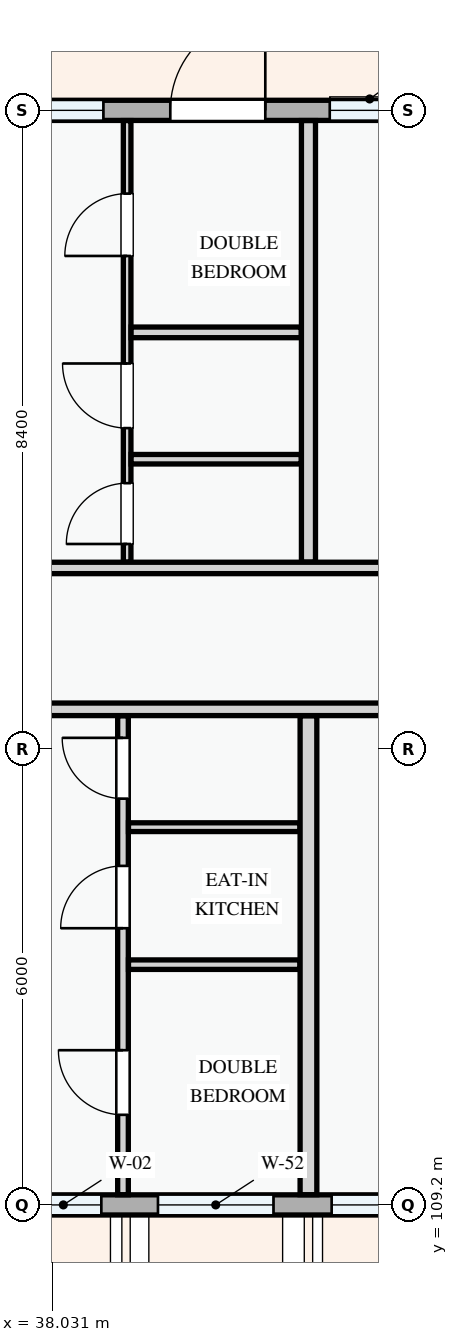
"""IFC4 building model, lengths in metres.
Left out: names, types, materials, properties, quantities, classifications, styles, units other than length and angle.
Written with IfcOpenShell. Run it as: python <this file> out.ifc"""

import sys

from ifc_helpers import new_model, si_unit, direction, frame, frame_2d, origin, place, context, subcontext, project, spatial, rectangle, extrude, element, fill, save


model = new_model("IFC4")
c1 = context("Model", 3, precision=1e-05, world=origin(), true_north=direction((0.0, 1.0)))
c2 = subcontext(c1, "Body", "Model", "MODEL_VIEW")
j1 = project(units=[si_unit("LENGTHUNIT", "METRE"), si_unit("PLANEANGLEUNIT", "RADIAN")], contexts=[c1])
p1 = place(None, origin())
s1 = spatial("IfcSite", under=j1, at=p1, CompositionType="ELEMENT")
p2 = place(p1, origin())
s2 = spatial("IfcBuilding", under=s1, at=p2, CompositionType="ELEMENT")
p3 = place(p2, frame((0.0, 0.0, 34.5)))
s3 = spatial("IfcBuildingStorey", under=s2, at=p3, CompositionType="ELEMENT", Elevation=34.5)
p4 = place(p3, frame((37.2, 109.2, 0.0), z_axis=(0.0, 0.0, 1.0), x_axis=(1.0, 0.0, 0.0)))
e1 = element("IfcWall", 1, at=p4, inside=s3, PredefinedType="STANDARD", context=c2, shape_type="SweptSolid", body=[
    extrude(rectangle(XDim=6.0, YDim=0.265, at=frame_2d((3.0, 0.0))), origin(), (0.0, 0.0, 1.0), 2.525),
])
p5 = place(p4, frame((0.475, 0.0, 0.78)))
e2 = element("IfcOpeningElement", 2, at=p5, cuts=e1, PredefinedType="OPENING", context=c2, shape_type="SweptSolid", body=[
    extrude(rectangle(XDim=1.0, YDim=1.25, at=frame_2d((0.5, 0.625))), frame((0.0, 0.143, 0.0), z_axis=(0.0, -1.0, 0.0), x_axis=(1.0, 0.0, 0.0)), (0.0, 0.0, 1.0), 0.285),
])
p6 = place(p4, frame((2.22, 0.0, 0.78)))
e3 = element("IfcOpeningElement", 3, at=p6, cuts=e1, PredefinedType="OPENING", context=c2, shape_type="SweptSolid", body=[
    extrude(rectangle(XDim=1.52, YDim=1.42, at=frame_2d((0.76, 0.71))), frame((0.0, 0.143, 0.0), z_axis=(0.0, -1.0, 0.0), x_axis=(1.0, 0.0, 0.0)), (0.0, 0.0, 1.0), 0.285),
])
p7 = place(p4, frame((4.505, 0.0, 0.78)))
e4 = element("IfcOpeningElement", 4, at=p7, cuts=e1, PredefinedType="OPENING", context=c2, shape_type="SweptSolid", body=[
    extrude(rectangle(XDim=1.0, YDim=1.25, at=frame_2d((0.5, 0.625))), frame((0.0, 0.143, 0.0), z_axis=(0.0, -1.0, 0.0), x_axis=(1.0, 0.0, 0.0)), (0.0, 0.0, 1.0), 0.285),
])
p8 = place(p3, frame((43.2, 123.6, 0.0), z_axis=(0.0, 0.0, 1.0), x_axis=(-1.0, 0.0, 0.0)))
e5 = element("IfcWall", 5, at=p8, inside=s3, PredefinedType="STANDARD", context=c2, shape_type="SweptSolid", body=[
    extrude(rectangle(XDim=6.0, YDim=0.265, at=frame_2d((3.0, 0.0))), origin(), (0.0, 0.0, 1.0), 2.445),
])
p9 = place(p8, frame((2.368, 0.0, 0.0)))
e6 = element("IfcOpeningElement", 6, at=p9, cuts=e5, PredefinedType="OPENING", context=c2, shape_type="SweptSolid", body=[
    extrude(rectangle(XDim=1.25, YDim=2.2, at=frame_2d((0.625, 1.1))), frame((0.0, 0.143, 0.0), z_axis=(0.0, -1.0, 0.0), x_axis=(1.0, 0.0, 0.0)), (0.0, 0.0, 1.0), 0.285),
])
p10 = place(p8, frame((0.47, 0.0, 0.78)))
e7 = element("IfcOpeningElement", 7, at=p10, cuts=e5, PredefinedType="OPENING", context=c2, shape_type="SweptSolid", body=[
    extrude(rectangle(XDim=1.05, YDim=1.2, at=frame_2d((0.525, 0.6))), frame((0.0, 0.143, 0.0), z_axis=(0.0, -1.0, 0.0), x_axis=(1.0, 0.0, 0.0)), (0.0, 0.0, 1.0), 0.285),
])
p11 = place(p8, frame((4.498, 0.0, 0.78)))
e8 = element("IfcOpeningElement", 8, at=p11, cuts=e5, PredefinedType="OPENING", context=c2, shape_type="SweptSolid", body=[
    extrude(rectangle(XDim=1.0, YDim=1.25, at=frame_2d((0.5, 0.625))), frame((0.0, 0.143, 0.0), z_axis=(0.0, -1.0, 0.0), x_axis=(1.0, 0.0, 0.0)), (0.0, 0.0, 1.0), 0.285),
])
p12 = place(p3, frame((38.96, 109.334, 0.0), z_axis=(0.0, 0.0, 1.0), x_axis=(0.0, 1.0, 0.0)))
e9 = element("IfcWall", 9, at=p12, inside=s3, PredefinedType="PARTITIONING", context=c2, shape_type="SweptSolid", body=[
    extrude(rectangle(XDim=6.301, YDim=0.14, at=frame_2d((3.15, 0.0))), origin(), (0.0, 0.0, 1.0), 3.0),
])
p13 = place(p12, frame((1.051, 0.0, 0.0)))
e10 = element("IfcOpeningElement", 10, at=p13, cuts=e9, PredefinedType="OPENING", context=c2, shape_type="SweptSolid", body=[
    extrude(rectangle(XDim=0.85, YDim=2.1, at=frame_2d((0.425, 1.05))), frame((0.0, 0.08, 0.0), z_axis=(0.0, -1.0, 0.0), x_axis=(1.0, 0.0, 0.0)), (0.0, 0.0, 1.0), 0.16),
])
p14 = place(p12, frame((3.506, 0.0, 0.0)))
e11 = element("IfcOpeningElement", 11, at=p14, cuts=e9, PredefinedType="OPENING", context=c2, shape_type="SweptSolid", body=[
    extrude(rectangle(XDim=0.82, YDim=2.08, at=frame_2d((0.41, 1.04))), frame((0.0, 0.08, 0.0), z_axis=(0.0, -1.0, 0.0), x_axis=(1.0, 0.0, 0.0)), (0.0, 0.0, 1.0), 0.16),
])
p15 = place(p12, frame((5.21, 0.0, 0.0)))
e12 = element("IfcOpeningElement", 12, at=p15, cuts=e9, PredefinedType="OPENING", context=c2, shape_type="SweptSolid", body=[
    extrude(rectangle(XDim=0.8, YDim=2.1, at=frame_2d((0.4, 1.05))), frame((0.0, 0.08, 0.0), z_axis=(0.0, -1.0, 0.0), x_axis=(1.0, 0.0, 0.0)), (0.0, 0.0, 1.0), 0.16),
])
p16 = place(p3, frame((39.032, 112.361, 0.0), z_axis=(0.0, 0.0, 1.0), x_axis=(1.0, 0.0, 0.0)))
e13 = element("IfcWall", 13, at=p16, inside=s3, PredefinedType="PARTITIONING", context=c2, shape_type="SweptSolid", body=[
    extrude(rectangle(XDim=2.256, YDim=0.125, at=frame_2d((1.128, 0.0))), origin(), (0.0, 0.0, 1.0), 3.0),
])
p17 = place(p3, frame((39.032, 114.17, 0.0), z_axis=(0.0, 0.0, 1.0), x_axis=(1.0, 0.0, 0.0)))
e14 = element("IfcWall", 14, at=p17, inside=s3, PredefinedType="PARTITIONING", context=c2, shape_type="SweptSolid", body=[
    extrude(rectangle(XDim=2.256, YDim=0.115, at=frame_2d((1.128, 0.0))), origin(), (0.0, 0.0, 1.0), 3.0),
])
p18 = place(p3, frame((39.014, 117.657, 0.0), z_axis=(0.0, 0.0, 1.0), x_axis=(0.0, 1.0, 0.0)))
e15 = element("IfcWall", 15, at=p18, inside=s3, PredefinedType="PARTITIONING", context=c2, shape_type="SweptSolid", body=[
    extrude(rectangle(XDim=5.809, YDim=0.1, at=frame_2d((2.904, 0.0))), origin(), (0.0, 0.0, 1.0), 3.0),
])
p19 = place(p18, frame((0.238, 0.0, 0.0)))
e16 = element("IfcOpeningElement", 16, at=p19, cuts=e15, PredefinedType="OPENING", context=c2, shape_type="SweptSolid", body=[
    extrude(rectangle(XDim=0.8, YDim=2.1, at=frame_2d((0.4, 1.05))), frame((0.0, 0.06, 0.0), z_axis=(0.0, -1.0, 0.0), x_axis=(1.0, 0.0, 0.0)), (0.0, 0.0, 1.0), 0.12),
])
p20 = place(p18, frame((1.763, 0.0, 0.0)))
e17 = element("IfcOpeningElement", 17, at=p20, cuts=e15, PredefinedType="OPENING", context=c2, shape_type="SweptSolid", body=[
    extrude(rectangle(XDim=0.85, YDim=2.1, at=frame_2d((0.425, 1.05))), frame((0.0, 0.06, 0.0), z_axis=(0.0, -1.0, 0.0), x_axis=(1.0, 0.0, 0.0)), (0.0, 0.0, 1.0), 0.12),
])
p21 = place(p18, frame((4.028, 0.0, 0.0)))
e18 = element("IfcOpeningElement", 18, at=p21, cuts=e15, PredefinedType="OPENING", context=c2, shape_type="SweptSolid", body=[
    extrude(rectangle(XDim=0.82, YDim=2.08, at=frame_2d((0.41, 1.04))), frame((0.0, 0.06, 0.0), z_axis=(0.0, -1.0, 0.0), x_axis=(1.0, 0.0, 0.0)), (0.0, 0.0, 1.0), 0.12),
])
p22 = place(p3, frame((39.066, 120.679, 0.0), z_axis=(0.0, 0.0, 1.0), x_axis=(1.0, 0.0, 0.0)))
e19 = element("IfcWall", 19, at=p22, inside=s3, PredefinedType="PARTITIONING", context=c2, shape_type="SweptSolid", body=[
    extrude(rectangle(XDim=2.239, YDim=0.14, at=frame_2d((1.12, 0.0))), origin(), (0.0, 0.0, 1.0), 3.0),
])
p23 = place(p3, frame((39.066, 119.01, 0.0), z_axis=(0.0, 0.0, 1.0), x_axis=(1.0, 0.0, 0.0)))
e20 = element("IfcWall", 20, at=p23, inside=s3, PredefinedType="PARTITIONING", context=c2, shape_type="SweptSolid", body=[
    extrude(rectangle(XDim=2.239, YDim=0.125, at=frame_2d((1.12, 0.0))), origin(), (0.0, 0.0, 1.0), 3.0),
])
p24 = place(p3, frame((41.4, 109.334, 0.0), z_axis=(0.0, 0.0, 1.0), x_axis=(0.0, 1.0, 0.0)))
e21 = element("IfcWall", 21, at=p24, inside=s3, PredefinedType="PARTITIONING", context=c2, shape_type="SweptSolid", body=[
    extrude(rectangle(XDim=6.301, YDim=0.22, at=frame_2d((3.15, 0.0))), origin(), (0.0, 0.0, 1.0), 3.0),
])
p25 = place(p3, frame((41.4, 117.657, 0.0), z_axis=(0.0, 0.0, 1.0), x_axis=(0.0, 1.0, 0.0)))
e22 = element("IfcWall", 22, at=p25, inside=s3, PredefinedType="PARTITIONING", context=c2, shape_type="SweptSolid", body=[
    extrude(rectangle(XDim=5.809, YDim=0.185, at=frame_2d((2.904, 0.0))), origin(), (0.0, 0.0, 1.0), 3.0),
])
p26 = place(p3, frame((25.15, 115.72, 0.0), z_axis=(0.0, 0.0, 1.0), x_axis=(1.0, 0.0, 0.0)))
e23 = element("IfcWall", 23, at=p26, inside=s3, PredefinedType="PARTITIONING", context=c2, shape_type="SweptSolid", body=[
    extrude(rectangle(XDim=26.316, YDim=0.165, at=frame_2d((13.158, 0.0))), origin(), (0.0, 0.0, 1.0), 3.0),
])
p27 = place(p26, frame((0.25, 0.0, 0.0)))
e24 = element("IfcOpeningElement", 24, at=p27, cuts=e23, PredefinedType="OPENING", context=c2, shape_type="SweptSolid", body=[
    extrude(rectangle(XDim=0.92, YDim=2.1, at=frame_2d((0.46, 1.05))), frame((0.0, 0.093, 0.0), z_axis=(0.0, -1.0, 0.0), x_axis=(1.0, 0.0, 0.0)), (0.0, 0.0, 1.0), 0.185),
])
p28 = place(p26, frame((9.22, 0.0, 0.0)))
e25 = element("IfcOpeningElement", 25, at=p28, cuts=e23, PredefinedType="OPENING", context=c2, shape_type="SweptSolid", body=[
    extrude(rectangle(XDim=0.92, YDim=2.1, at=frame_2d((0.46, 1.05))), frame((0.0, 0.093, 0.0), z_axis=(0.0, -1.0, 0.0), x_axis=(1.0, 0.0, 0.0)), (0.0, 0.0, 1.0), 0.185),
])
p29 = place(p26, frame((20.11, 0.0, 0.0)))
e26 = element("IfcOpeningElement", 26, at=p29, cuts=e23, PredefinedType="OPENING", context=c2, shape_type="SweptSolid", body=[
    extrude(rectangle(XDim=0.92, YDim=2.1, at=frame_2d((0.46, 1.05))), frame((0.0, 0.093, 0.0), z_axis=(0.0, -1.0, 0.0), x_axis=(1.0, 0.0, 0.0)), (0.0, 0.0, 1.0), 0.185),
])
p30 = place(p3, frame((22.66, 117.58, 0.0), z_axis=(0.0, 0.0, 1.0), x_axis=(1.0, 0.0, 0.0)))
e27 = element("IfcWall", 27, at=p30, inside=s3, PredefinedType="PARTITIONING", context=c2, shape_type="SweptSolid", body=[
    extrude(rectangle(XDim=28.806, YDim=0.15, at=frame_2d((14.403, 0.0))), origin(), (0.0, 0.0, 1.0), 3.0),
])
p31 = place(p30, frame((2.74, 0.0, 0.0)))
e28 = element("IfcOpeningElement", 28, at=p31, cuts=e27, PredefinedType="OPENING", context=c2, shape_type="SweptSolid", body=[
    extrude(rectangle(XDim=0.92, YDim=2.1, at=frame_2d((0.46, 1.05))), frame((0.0, 0.085, 0.0), z_axis=(0.0, -1.0, 0.0), x_axis=(1.0, 0.0, 0.0)), (0.0, 0.0, 1.0), 0.17),
])
p32 = place(p30, frame((11.71, 0.0, 0.0)))
e29 = element("IfcOpeningElement", 29, at=p32, cuts=e27, PredefinedType="OPENING", context=c2, shape_type="SweptSolid", body=[
    extrude(rectangle(XDim=0.96, YDim=2.12, at=frame_2d((0.48, 1.06))), frame((0.0, 0.085, 0.0), z_axis=(0.0, -1.0, 0.0), x_axis=(1.0, 0.0, 0.0)), (0.0, 0.0, 1.0), 0.17),
])
p33 = place(p30, frame((22.397, 0.0, 0.0)))
e30 = element("IfcOpeningElement", 30, at=p33, cuts=e27, PredefinedType="OPENING", context=c2, shape_type="SweptSolid", body=[
    extrude(rectangle(XDim=0.92, YDim=2.1, at=frame_2d((0.46, 1.05))), frame((0.0, 0.085, 0.0), z_axis=(0.0, -1.0, 0.0), x_axis=(1.0, 0.0, 0.0)), (0.0, 0.0, 1.0), 0.17),
])
p34 = place(p5, origin())
e31 = element("IfcWindow", 31, at=p34, inside=s3, PartitioningType="SINGLE_PANEL", PredefinedType="WINDOW", context=c2, shape_type="SweptSolid", body=[
    extrude(rectangle(XDim=1.0, YDim=1.25, at=frame_2d((0.5, 0.625))), frame((0.0, 0.03, 0.0), z_axis=(0.0, -1.0, 0.0), x_axis=(1.0, 0.0, 0.0)), (0.0, 0.0, 1.0), 0.06),
])
fill(e2, e31)
p35 = place(p6, origin())
e32 = element("IfcWindow", 32, at=p35, inside=s3, PartitioningType="SINGLE_PANEL", PredefinedType="WINDOW", context=c2, shape_type="SweptSolid", body=[
    extrude(rectangle(XDim=1.52, YDim=1.42, at=frame_2d((0.76, 0.71))), frame((0.0, 0.03, 0.0), z_axis=(0.0, -1.0, 0.0), x_axis=(1.0, 0.0, 0.0)), (0.0, 0.0, 1.0), 0.06),
])
fill(e3, e32)
p36 = place(p7, origin())
e33 = element("IfcWindow", 33, at=p36, inside=s3, PartitioningType="SINGLE_PANEL", PredefinedType="WINDOW", context=c2, shape_type="SweptSolid", body=[
    extrude(rectangle(XDim=1.0, YDim=1.25, at=frame_2d((0.5, 0.625))), frame((0.0, 0.03, 0.0), z_axis=(0.0, -1.0, 0.0), x_axis=(1.0, 0.0, 0.0)), (0.0, 0.0, 1.0), 0.06),
])
fill(e4, e33)
p37 = place(p9, frame((1.25, 0.0, 0.0), z_axis=(0.0, 0.0, 1.0), x_axis=(-1.0, 0.0, 0.0)))
e34 = element("IfcDoor", 34, at=p37, inside=s3, OperationType="SINGLE_SWING_RIGHT", PredefinedType="DOOR", context=c2, shape_type="SweptSolid", body=[
    extrude(rectangle(XDim=1.25, YDim=2.2, at=frame_2d((0.625, 1.1))), frame((0.0, 0.025, 0.0), z_axis=(0.0, -1.0, 0.0), x_axis=(1.0, 0.0, 0.0)), (0.0, 0.0, 1.0), 0.05),
])
fill(e6, e34)
p38 = place(p10, origin())
e35 = element("IfcWindow", 35, at=p38, inside=s3, PartitioningType="SINGLE_PANEL", PredefinedType="WINDOW", context=c2, shape_type="SweptSolid", body=[
    extrude(rectangle(XDim=1.05, YDim=1.2, at=frame_2d((0.525, 0.6))), frame((0.0, 0.03, 0.0), z_axis=(0.0, -1.0, 0.0), x_axis=(1.0, 0.0, 0.0)), (0.0, 0.0, 1.0), 0.06),
])
fill(e7, e35)
p39 = place(p11, origin())
e36 = element("IfcWindow", 36, at=p39, inside=s3, PartitioningType="SINGLE_PANEL", PredefinedType="WINDOW", context=c2, shape_type="SweptSolid", body=[
    extrude(rectangle(XDim=1.0, YDim=1.25, at=frame_2d((0.5, 0.625))), frame((0.0, 0.03, 0.0), z_axis=(0.0, -1.0, 0.0), x_axis=(1.0, 0.0, 0.0)), (0.0, 0.0, 1.0), 0.06),
])
fill(e8, e36)
p40 = place(p13, origin())
e37 = element("IfcDoor", 37, at=p40, inside=s3, OperationType="SINGLE_SWING_RIGHT", PredefinedType="DOOR", context=c2, shape_type="SweptSolid", body=[
    extrude(rectangle(XDim=0.85, YDim=2.1, at=frame_2d((0.425, 1.05))), frame((0.0, 0.025, 0.0), z_axis=(0.0, -1.0, 0.0), x_axis=(1.0, 0.0, 0.0)), (0.0, 0.0, 1.0), 0.05),
])
fill(e10, e37)
p41 = place(p14, origin())
e38 = element("IfcDoor", 38, at=p41, inside=s3, OperationType="SINGLE_SWING_LEFT", PredefinedType="DOOR", context=c2, shape_type="SweptSolid", body=[
    extrude(rectangle(XDim=0.82, YDim=2.08, at=frame_2d((0.41, 1.04))), frame((0.0, 0.025, 0.0), z_axis=(0.0, -1.0, 0.0), x_axis=(1.0, 0.0, 0.0)), (0.0, 0.0, 1.0), 0.05),
])
fill(e11, e38)
p42 = place(p15, origin())
e39 = element("IfcDoor", 39, at=p42, inside=s3, OperationType="SINGLE_SWING_RIGHT", PredefinedType="DOOR", context=c2, shape_type="SweptSolid", body=[
    extrude(rectangle(XDim=0.8, YDim=2.1, at=frame_2d((0.4, 1.05))), frame((0.0, 0.025, 0.0), z_axis=(0.0, -1.0, 0.0), x_axis=(1.0, 0.0, 0.0)), (0.0, 0.0, 1.0), 0.05),
])
fill(e12, e39)
p43 = place(p19, origin())
e40 = element("IfcDoor", 40, at=p43, inside=s3, OperationType="SINGLE_SWING_LEFT", PredefinedType="DOOR", context=c2, shape_type="SweptSolid", body=[
    extrude(rectangle(XDim=0.8, YDim=2.1, at=frame_2d((0.4, 1.05))), frame((0.0, 0.025, 0.0), z_axis=(0.0, -1.0, 0.0), x_axis=(1.0, 0.0, 0.0)), (0.0, 0.0, 1.0), 0.05),
])
fill(e16, e40)
p44 = place(p20, origin())
e41 = element("IfcDoor", 41, at=p44, inside=s3, OperationType="SINGLE_SWING_RIGHT", PredefinedType="DOOR", context=c2, shape_type="SweptSolid", body=[
    extrude(rectangle(XDim=0.85, YDim=2.1, at=frame_2d((0.425, 1.05))), frame((0.0, 0.025, 0.0), z_axis=(0.0, -1.0, 0.0), x_axis=(1.0, 0.0, 0.0)), (0.0, 0.0, 1.0), 0.05),
])
fill(e17, e41)
p45 = place(p21, origin())
e42 = element("IfcDoor", 42, at=p45, inside=s3, OperationType="SINGLE_SWING_LEFT", PredefinedType="DOOR", context=c2, shape_type="SweptSolid", body=[
    extrude(rectangle(XDim=0.82, YDim=2.08, at=frame_2d((0.41, 1.04))), frame((0.0, 0.025, 0.0), z_axis=(0.0, -1.0, 0.0), x_axis=(1.0, 0.0, 0.0)), (0.0, 0.0, 1.0), 0.05),
])
fill(e18, e42)
save(model, sys.argv[1])
